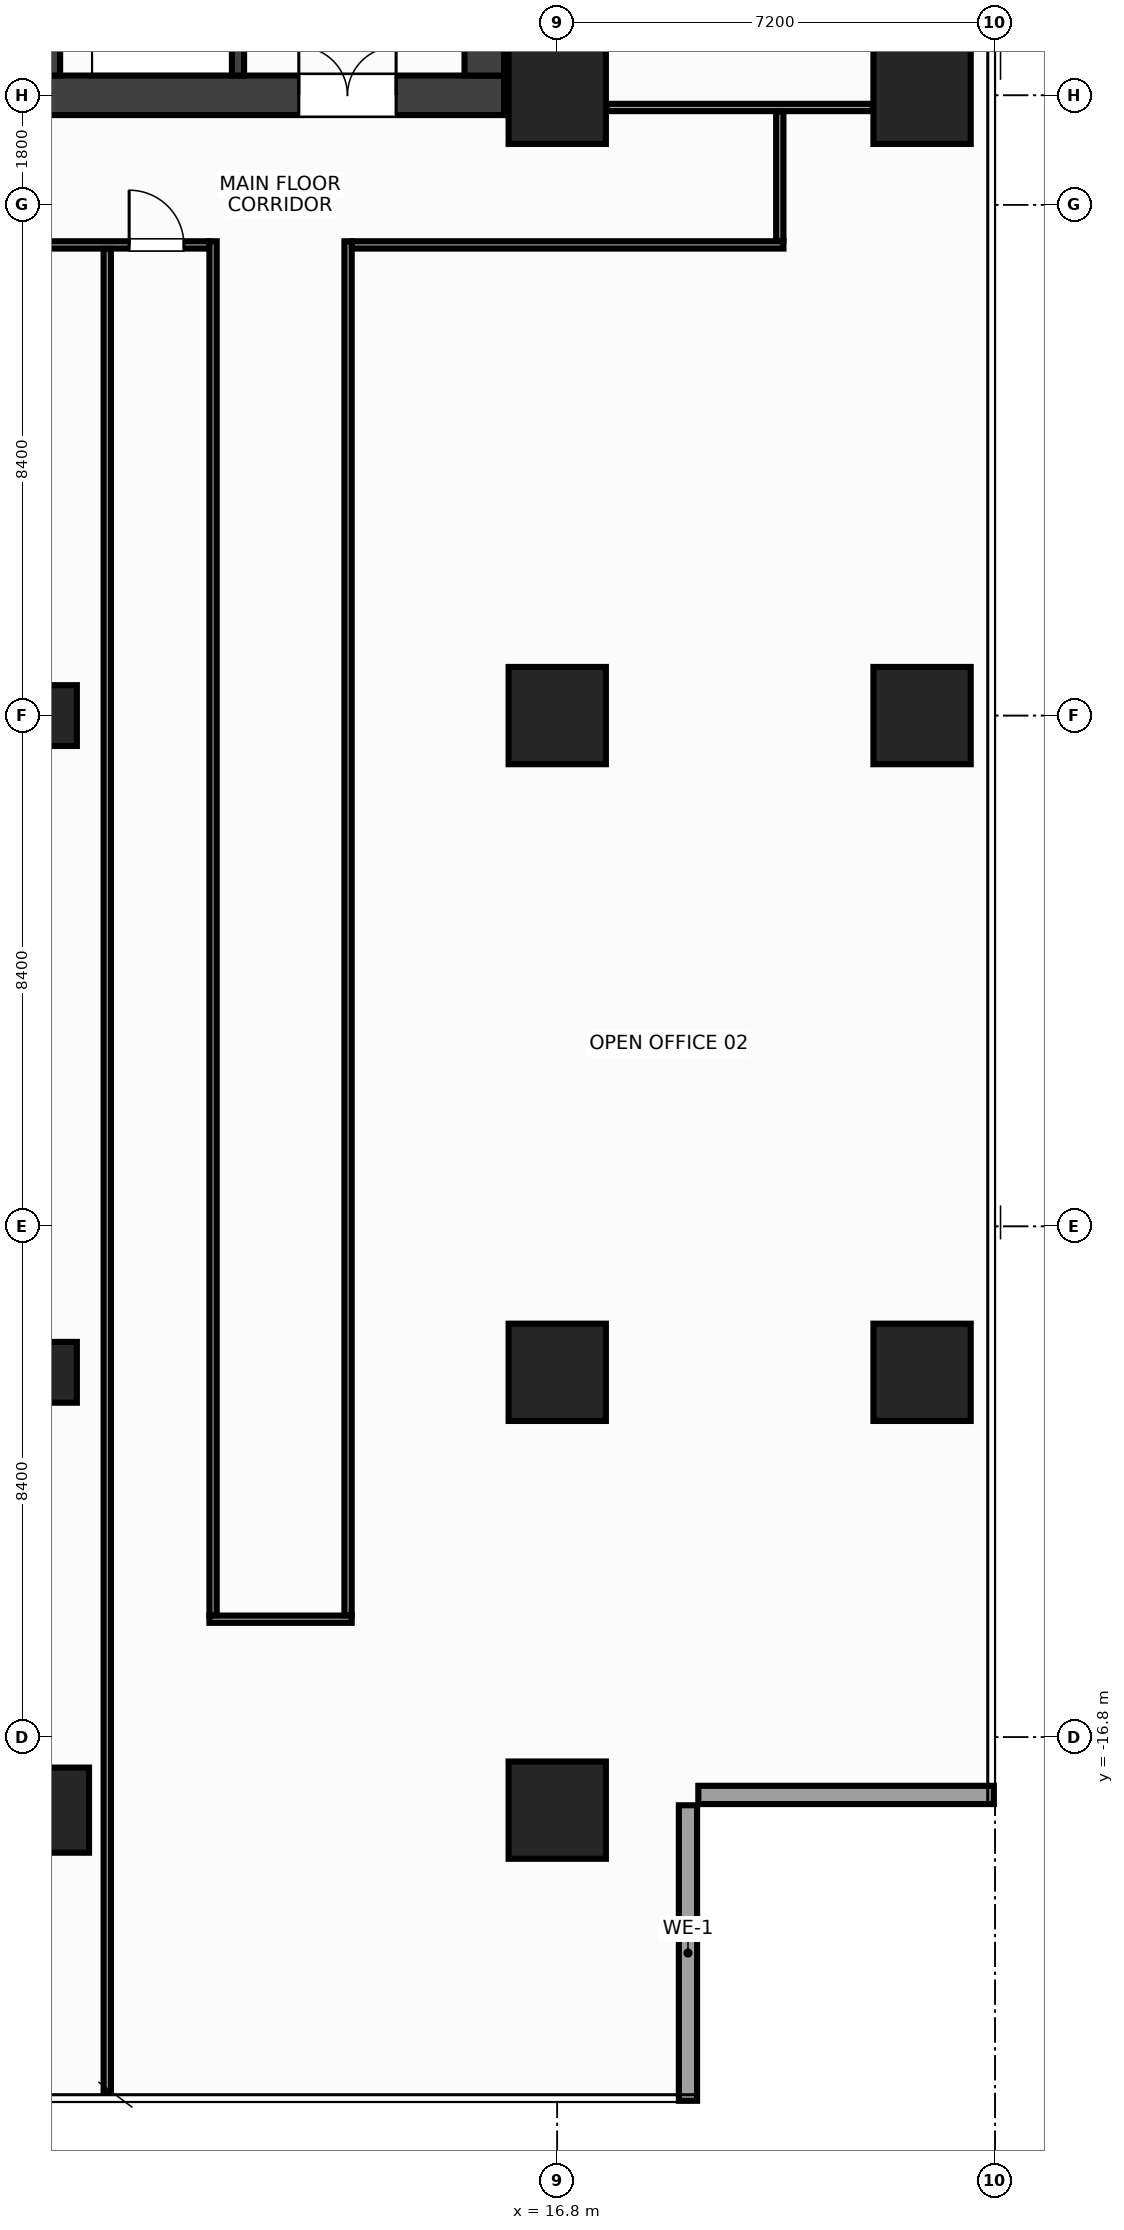
"""IFC4 building model, lengths in metres.
Left out: names, types, materials, properties, quantities, classifications, styles, units other than length and angle.
Written with IfcOpenShell. Run it as: python <this file> out.ifc"""

import sys

from ifc_helpers import new_model, si_unit, direction, frame, frame_2d, origin, origin_2d, place, context, subcontext, project, spatial, rectangle, hollow_rectangle, extrude, source, transform, mapped, element, fill, save


model = new_model("IFC4")
c1 = context("Model", 3, precision=1e-05, world=origin(), true_north=direction((0.0, 1.0)))
c2 = subcontext(c1, "Body", "Model", "MODEL_VIEW")
j1 = project(units=[si_unit("LENGTHUNIT", "METRE"), si_unit("PLANEANGLEUNIT", "RADIAN")], contexts=[c1])
p1 = place(None, origin())
s1 = spatial("IfcSite", under=j1, at=p1, CompositionType="ELEMENT")
p2 = place(p1, origin())
s2 = spatial("IfcBuilding", under=s1, at=p2, CompositionType="ELEMENT")
p3 = place(p2, frame((0.0, 0.0, 138.8)))
s3 = spatial("IfcBuildingStorey", under=s2, at=p3, CompositionType="ELEMENT", Elevation=138.8)
m1 = source(origin(), c2, "Body", "SweptSolid", [
    extrude(rectangle(XDim=31.85, YDim=0.65, at=frame_2d((15.925, 0.0))), origin(), (0.0, 0.0, 1.0), 3.6),
])
p4 = place(p3, frame((-15.925, 10.2, 0.0), z_axis=(0.0, 0.0, 1.0), x_axis=(1.0, 0.0, 0.0)))
e1 = element("IfcWall", 1, at=p4, inside=s3, PredefinedType="SHEAR", context=c2, shape_type="MappedRepresentation", body=[
    mapped(m1, transform((0.0, 0.0, 0.0), x_axis=(1.0, 0.0, 0.0), y_axis=(0.0, 1.0, 0.0), z_axis=(0.0, 0.0, 1.0), scale=1.0)),
])
p5 = place(p4, frame((1.775, 0.0, 0.0)))
e2 = element("IfcOpeningElement", 2, at=p5, cuts=e1, PredefinedType="OPENING", context=c2, shape_type="SweptSolid", body=[
    extrude(rectangle(XDim=1.6, YDim=2.15, at=frame_2d((0.8, 1.075))), frame((0.0, 0.337, 0.0), z_axis=(0.0, -1.0, 0.0), x_axis=(1.0, 0.0, 0.0)), (0.0, 0.0, 1.0), 0.674),
])
p6 = place(p4, frame((28.475, 0.0, 0.0)))
e3 = element("IfcOpeningElement", 3, at=p6, cuts=e1, PredefinedType="OPENING", context=c2, shape_type="SweptSolid", body=[
    extrude(rectangle(XDim=1.6, YDim=2.15, at=frame_2d((0.8, 1.075))), frame((0.0, 0.337, 0.0), z_axis=(0.0, -1.0, 0.0), x_axis=(1.0, 0.0, 0.0)), (0.0, 0.0, 1.0), 0.674),
])
p7 = place(p4, frame((15.175, 0.0, 0.0)))
e4 = element("IfcOpeningElement", 4, at=p7, cuts=e1, PredefinedType="OPENING", context=c2, shape_type="SweptSolid", body=[
    extrude(rectangle(XDim=1.5, YDim=2.2, at=frame_2d((0.75, 1.1))), frame((0.0, 0.337, 0.0), z_axis=(0.0, -1.0, 0.0), x_axis=(1.0, 0.0, 0.0)), (0.0, 0.0, 1.0), 0.674),
])
m2 = source(origin(), c2, "Body", "SweptSolid", [
    extrude(rectangle(XDim=12.95, YDim=0.65, at=frame_2d((6.475, 0.0))), origin(), (0.0, 0.0, 1.0), 3.6),
])
p8 = place(p3, frame((15.6, 10.525, 0.0), z_axis=(0.0, 0.0, 1.0), x_axis=(0.0, 1.0, 0.0)))
e5 = element("IfcWall", 5, at=p8, inside=s3, PredefinedType="SHEAR", context=c2, shape_type="MappedRepresentation", body=[
    mapped(m2, transform((0.0, 0.0, 0.0), x_axis=(1.0, 0.0, 0.0), y_axis=(0.0, 1.0, 0.0), z_axis=(0.0, 0.0, 1.0), scale=1.0)),
])
m3 = source(origin(), c2, "Body", "SweptSolid", [
    extrude(rectangle(XDim=12.95, YDim=0.25, at=frame_2d((6.475, 0.0))), origin(), (0.0, 0.0, 1.0), 3.6),
])
p9 = place(p3, frame((8.5, 10.525, 0.0), z_axis=(0.0, 0.0, 1.0), x_axis=(0.0, 1.0, 0.0)))
e6 = element("IfcWall", 6, at=p9, inside=s3, PredefinedType="SHEAR", context=c2, shape_type="MappedRepresentation", body=[
    mapped(m3, transform((0.0, 0.0, 0.0), x_axis=(1.0, 0.0, 0.0), y_axis=(0.0, 1.0, 0.0), z_axis=(0.0, 0.0, 1.0), scale=1.0)),
])
p10 = place(p9, frame((9.925, 0.0, 0.0)))
e7 = element("IfcOpeningElement", 7, at=p10, cuts=e6, PredefinedType="OPENING", context=c2, shape_type="SweptSolid", body=[
    extrude(rectangle(XDim=0.95, YDim=2.15, at=frame_2d((0.475, 1.075))), frame((0.0, 0.137, 0.0), z_axis=(0.0, -1.0, 0.0), x_axis=(1.0, 0.0, 0.0)), (0.0, 0.0, 1.0), 0.274),
])
m4 = source(origin(), c2, "Body", "SweptSolid", [
    extrude(rectangle(XDim=3.125, YDim=0.2, at=frame_2d((1.562, 0.0))), origin(), (0.0, 0.0, 1.0), 3.6),
])
p11 = place(p3, frame((11.55, 10.525, 0.0), z_axis=(0.0, 0.0, 1.0), x_axis=(0.0, 1.0, 0.0)))
e8 = element("IfcWall", 8, at=p11, inside=s3, PredefinedType="SHEAR", context=c2, shape_type="MappedRepresentation", body=[
    mapped(m4, transform((0.0, 0.0, 0.0), x_axis=(1.0, 0.0, 0.0), y_axis=(0.0, 1.0, 0.0), z_axis=(0.0, 0.0, 1.0), scale=1.0)),
])
p12 = place(p11, frame((0.9, 0.0, 0.0)))
e9 = element("IfcOpeningElement", 9, at=p12, cuts=e8, PredefinedType="OPENING", context=c2, shape_type="SweptSolid", body=[
    extrude(rectangle(XDim=1.1, YDim=2.15, at=frame_2d((0.55, 1.075))), frame((0.0, 0.112, 0.0), z_axis=(0.0, -1.0, 0.0), x_axis=(1.0, 0.0, 0.0)), (0.0, 0.0, 1.0), 0.224),
])
m5 = source(origin(), c2, "Body", "SweptSolid", [
    extrude(rectangle(XDim=1.6, YDim=1.6, at=origin_2d()), origin(), (0.0, 0.0, 1.0), 3.6),
])
for number, where, z_axis, x_axis in (
    (10, (16.8, -18.0, 0.0), (0.0, 0.0, 1.0), (1.0, 0.0, 0.0)),
    (11, (16.8, -10.8, 0.0), (0.0, 0.0, 1.0), (1.0, 0.0, 0.0)),
    (12, (16.8, 0.0, 0.0), (0.0, 0.0, 1.0), (1.0, 0.0, 0.0)),
    (13, (16.8, 10.2, 0.0), (0.0, 0.0, 1.0), (1.0, 0.0, 0.0)),
    (14, (22.8, -10.8, 0.0), (0.0, 0.0, 1.0), (1.0, 0.0, 0.0)),
    (15, (22.8, 0.0, 0.0), (0.0, 0.0, 1.0), (1.0, 0.0, 0.0)),
    (16, (22.8, 10.2, 0.0), (0.0, 0.0, 1.0), (1.0, 0.0, 0.0)),
):
    element("IfcColumn", number, at=place(p3, frame(where, z_axis=z_axis, x_axis=x_axis)), inside=s3, PredefinedType="COLUMN", context=c2, shape_type="MappedRepresentation", body=[
        mapped(m5, transform((0.0, 0.0, 0.0), x_axis=(1.0, 0.0, 0.0), y_axis=(0.0, 1.0, 0.0), z_axis=(0.0, 0.0, 1.0), scale=1.0)),
    ])
m6 = source(origin(), c2, "Body", "SweptSolid", [
    extrude(rectangle(XDim=1.4, YDim=1.4, at=origin_2d()), origin(), (0.0, 0.0, 1.0), 3.6),
])
p13 = place(p3, frame((8.4, -18.0, 0.0), z_axis=(0.0, 0.0, 1.0), x_axis=(1.0, 0.0, 0.0)))
e17 = element("IfcColumn", 17, at=p13, inside=s3, PredefinedType="COLUMN", context=c2, shape_type="MappedRepresentation", body=[
    mapped(m6, transform((0.0, 0.0, 0.0), x_axis=(1.0, 0.0, 0.0), y_axis=(0.0, 1.0, 0.0), z_axis=(0.0, 0.0, 1.0), scale=1.0)),
])
m7 = source(origin(), c2, "Body", "SweptSolid", [
    extrude(hollow_rectangle(XDim=1.0, YDim=1.0, WallThickness=0.045, at=origin_2d()), origin(), (0.0, 0.0, 1.0), 3.6),
])
for number, where, z_axis, x_axis in (
    (18, (8.4, 0.0, 0.0), (0.0, 0.0, 1.0), (1.0, 0.0, 0.0)),
    (19, (8.4, -10.8, 0.0), (0.0, 0.0, 1.0), (1.0, 0.0, 0.0)),
):
    element("IfcColumn", number, at=place(p3, frame(where, z_axis=z_axis, x_axis=x_axis)), inside=s3, PredefinedType="COLUMN", context=c2, shape_type="MappedRepresentation", body=[
        mapped(m7, transform((0.0, 0.0, 0.0), x_axis=(1.0, 0.0, 0.0), y_axis=(0.0, 1.0, 0.0), z_axis=(0.0, 0.0, 1.0), scale=1.0)),
    ])
m8 = source(origin(), c2, "Body", "SweptSolid", [
    extrude(rectangle(XDim=4.86, YDim=0.3, at=frame_2d((2.43, 0.0))), origin(), (0.0, 0.0, 1.0), 2.76),
])
p14 = place(p3, frame((18.95, -22.78, 0.0), z_axis=(0.0, 0.0, 1.0), x_axis=(0.0, 1.0, 0.0)))
e20 = element("IfcWall", 20, at=p14, inside=s3, PredefinedType="STANDARD", context=c2, shape_type="MappedRepresentation", body=[
    mapped(m8, transform((0.0, 0.0, 0.0), x_axis=(1.0, 0.0, 0.0), y_axis=(0.0, 1.0, 0.0), z_axis=(0.0, 0.0, 1.0), scale=1.0)),
])
m9 = source(origin(), c2, "Body", "SweptSolid", [
    extrude(rectangle(XDim=4.86, YDim=0.3, at=frame_2d((2.43, 0.0))), origin(), (0.0, 0.0, 1.0), 2.76),
])
p15 = place(p3, frame((19.12, -17.75, 0.0), z_axis=(0.0, 0.0, 1.0), x_axis=(1.0, 0.0, 0.0)))
e21 = element("IfcWall", 21, at=p15, inside=s3, PredefinedType="STANDARD", context=c2, shape_type="MappedRepresentation", body=[
    mapped(m9, transform((0.0, 0.0, 0.0), x_axis=(1.0, 0.0, 0.0), y_axis=(0.0, 1.0, 0.0), z_axis=(0.0, 0.0, 1.0), scale=1.0)),
])
m10 = source(origin(), c2, "Body", "SweptSolid", [
    extrude(rectangle(XDim=4.38, YDim=0.12, at=frame_2d((2.19, 0.0))), origin(), (0.0, 0.0, 1.0), 2.915),
])
p16 = place(p3, frame((17.61, 10.0, 0.0), z_axis=(0.0, 0.0, 1.0), x_axis=(1.0, 0.0, 0.0)))
e22 = element("IfcWall", 22, at=p16, inside=s3, PredefinedType="PARTITIONING", context=c2, shape_type="MappedRepresentation", body=[
    mapped(m10, transform((0.0, 0.0, 0.0), x_axis=(1.0, 0.0, 0.0), y_axis=(0.0, 1.0, 0.0), z_axis=(0.0, 0.0, 1.0), scale=1.0)),
])
m11 = source(origin(), c2, "Body", "SweptSolid", [
    extrude(rectangle(XDim=31.6, YDim=0.12, at=frame_2d((15.8, 0.0))), origin(), (0.0, 0.0, 1.0), 2.765),
])
p17 = place(p3, frame((-20.52, 7.74, 0.0), z_axis=(0.0, 0.0, 1.0), x_axis=(1.0, 0.0, 0.0)))
e23 = element("IfcWall", 23, at=p17, inside=s3, PredefinedType="PARTITIONING", context=c2, shape_type="MappedRepresentation", body=[
    mapped(m11, transform((0.0, 0.0, 0.0), x_axis=(1.0, 0.0, 0.0), y_axis=(0.0, 1.0, 0.0), z_axis=(0.0, 0.0, 1.0), scale=1.0)),
])
p18 = place(p17, frame((1.74, 0.0, 0.0)))
e24 = element("IfcOpeningElement", 24, at=p18, cuts=e23, PredefinedType="OPENING", context=c2, shape_type="SweptSolid", body=[
    extrude(rectangle(XDim=0.9, YDim=2.15, at=frame_2d((0.45, 1.075))), frame((0.0, 0.072, 0.0), z_axis=(0.0, -1.0, 0.0), x_axis=(1.0, 0.0, 0.0)), (0.0, 0.0, 1.0), 0.144),
])
p19 = place(p17, frame((30.28, 0.0, 0.0)))
e25 = element("IfcOpeningElement", 25, at=p19, cuts=e23, PredefinedType="OPENING", context=c2, shape_type="SweptSolid", body=[
    extrude(rectangle(XDim=0.9, YDim=2.15, at=frame_2d((0.45, 1.075))), frame((0.0, 0.072, 0.0), z_axis=(0.0, -1.0, 0.0), x_axis=(1.0, 0.0, 0.0)), (0.0, 0.0, 1.0), 0.144),
])
p20 = place(p17, frame((10.67, 0.0, 0.0)))
e26 = element("IfcOpeningElement", 26, at=p20, cuts=e23, PredefinedType="OPENING", context=c2, shape_type="SweptSolid", body=[
    extrude(rectangle(XDim=0.9, YDim=2.15, at=frame_2d((0.45, 1.075))), frame((0.0, 0.072, 0.0), z_axis=(0.0, -1.0, 0.0), x_axis=(1.0, 0.0, 0.0)), (0.0, 0.0, 1.0), 0.144),
])
p21 = place(p17, frame((23.47, 0.0, 0.0)))
e27 = element("IfcOpeningElement", 27, at=p21, cuts=e23, PredefinedType="OPENING", context=c2, shape_type="SweptSolid", body=[
    extrude(rectangle(XDim=0.9, YDim=2.15, at=frame_2d((0.45, 1.075))), frame((0.0, 0.072, 0.0), z_axis=(0.0, -1.0, 0.0), x_axis=(1.0, 0.0, 0.0)), (0.0, 0.0, 1.0), 0.144),
])
m12 = source(origin(), c2, "Body", "SweptSolid", [
    extrude(rectangle(XDim=7.1, YDim=0.12, at=frame_2d((3.55, 0.0))), origin(), (0.0, 0.0, 1.0), 2.765),
])
p22 = place(p3, frame((13.42, 7.74, 0.0), z_axis=(0.0, 0.0, 1.0), x_axis=(1.0, 0.0, 0.0)))
e28 = element("IfcWall", 28, at=p22, inside=s3, PredefinedType="PARTITIONING", context=c2, shape_type="MappedRepresentation", body=[
    mapped(m12, transform((0.0, 0.0, 0.0), x_axis=(1.0, 0.0, 0.0), y_axis=(0.0, 1.0, 0.0), z_axis=(0.0, 0.0, 1.0), scale=1.0)),
])
m13 = source(origin(), c2, "Body", "SweptSolid", [
    extrude(rectangle(XDim=2.34, YDim=0.12, at=frame_2d((1.17, 0.0))), origin(), (0.0, 0.0, 1.0), 3.38),
])
p23 = place(p3, frame((11.08, -14.86, 0.0), z_axis=(0.0, 0.0, 1.0), x_axis=(1.0, 0.0, 0.0)))
e29 = element("IfcWall", 29, at=p23, inside=s3, PredefinedType="PARTITIONING", context=c2, shape_type="MappedRepresentation", body=[
    mapped(m13, transform((0.0, 0.0, 0.0), x_axis=(1.0, 0.0, 0.0), y_axis=(0.0, 1.0, 0.0), z_axis=(0.0, 0.0, 1.0), scale=1.0)),
])
m14 = source(origin(), c2, "Body", "SweptSolid", [
    extrude(rectangle(XDim=2.13, YDim=0.12, at=frame_2d((1.065, 0.0))), origin(), (0.0, 0.0, 1.0), 3.38),
])
p24 = place(p3, frame((20.46, 7.805, 0.0), z_axis=(0.0, 0.0, 1.0), x_axis=(0.0, 1.0, 0.0)))
e30 = element("IfcWall", 30, at=p24, inside=s3, PredefinedType="PARTITIONING", context=c2, shape_type="MappedRepresentation", body=[
    mapped(m14, transform((0.0, 0.0, 0.0), x_axis=(1.0, 0.0, 0.0), y_axis=(0.0, 1.0, 0.0), z_axis=(0.0, 0.0, 1.0), scale=1.0)),
])
m15 = source(origin(), c2, "Body", "SweptSolid", [
    extrude(rectangle(XDim=22.595, YDim=0.12, at=frame_2d((11.297, 0.0))), origin(), (0.0, 0.0, 1.0), 2.665),
])
for number, where, z_axis, x_axis in (
    (31, (11.14, -14.795, 0.0), (0.0, 0.0, 1.0), (0.0, 1.0, 0.0)),
    (32, (13.36, -14.795, 0.0), (0.0, 0.0, 1.0), (0.0, 1.0, 0.0)),
):
    element("IfcWall", number, at=place(p3, frame(where, z_axis=z_axis, x_axis=x_axis)), inside=s3, PredefinedType="PARTITIONING", context=c2, shape_type="MappedRepresentation", body=[
        mapped(m15, transform((0.0, 0.0, 0.0), x_axis=(1.0, 0.0, 0.0), y_axis=(0.0, 1.0, 0.0), z_axis=(0.0, 0.0, 1.0), scale=1.0)),
    ])
m16 = source(origin(), c2, "Body", "SweptSolid", [
    extrude(rectangle(XDim=30.325, YDim=0.12, at=frame_2d((15.163, 0.0))), origin(), (0.0, 0.0, 1.0), 2.665),
])
p25 = place(p3, frame((9.4, -22.65, 0.0), z_axis=(0.0, 0.0, 1.0), x_axis=(0.0, 1.0, 0.0)))
e33 = element("IfcWall", 33, at=p25, inside=s3, PredefinedType="PARTITIONING", context=c2, shape_type="MappedRepresentation", body=[
    mapped(m16, transform((0.0, 0.0, 0.0), x_axis=(1.0, 0.0, 0.0), y_axis=(0.0, 1.0, 0.0), z_axis=(0.0, 0.0, 1.0), scale=1.0)),
])
m17 = source(origin(), c2, "Body", "SweptSolid", [
    extrude(rectangle(XDim=1.6, YDim=2.15, at=frame_2d((0.8, 1.075))), frame((0.0, 0.025, 0.0), z_axis=(0.0, -1.0, 0.0), x_axis=(1.0, 0.0, 0.0)), (0.0, 0.0, 1.0), 0.05),
])
p26 = place(p6, origin())
e34 = element("IfcDoor", 34, at=p26, inside=s3, OperationType="DOUBLE_DOOR_SINGLE_SWING", PredefinedType="DOOR", context=c2, shape_type="MappedRepresentation", body=[
    mapped(m17, transform((0.0, 0.0, 0.0), x_axis=(1.0, 0.0, 0.0), y_axis=(0.0, 1.0, 0.0), z_axis=(0.0, 0.0, 1.0), scale=1.0)),
])
fill(e3, e34)
m18 = source(origin(), c2, "Body", "SweptSolid", [
    extrude(rectangle(XDim=0.9, YDim=2.15, at=frame_2d((0.45, 1.075))), frame((0.0, 0.025, 0.0), z_axis=(0.0, -1.0, 0.0), x_axis=(1.0, 0.0, 0.0)), (0.0, 0.0, 1.0), 0.05),
])
p27 = place(p19, origin())
e35 = element("IfcDoor", 35, at=p27, inside=s3, OperationType="SINGLE_SWING_LEFT", PredefinedType="DOOR", context=c2, shape_type="MappedRepresentation", body=[
    mapped(m18, transform((0.0, 0.0, 0.0), x_axis=(1.0, 0.0, 0.0), y_axis=(0.0, 1.0, 0.0), z_axis=(0.0, 0.0, 1.0), scale=1.0)),
])
fill(e25, e35)
save(model, sys.argv[1])
